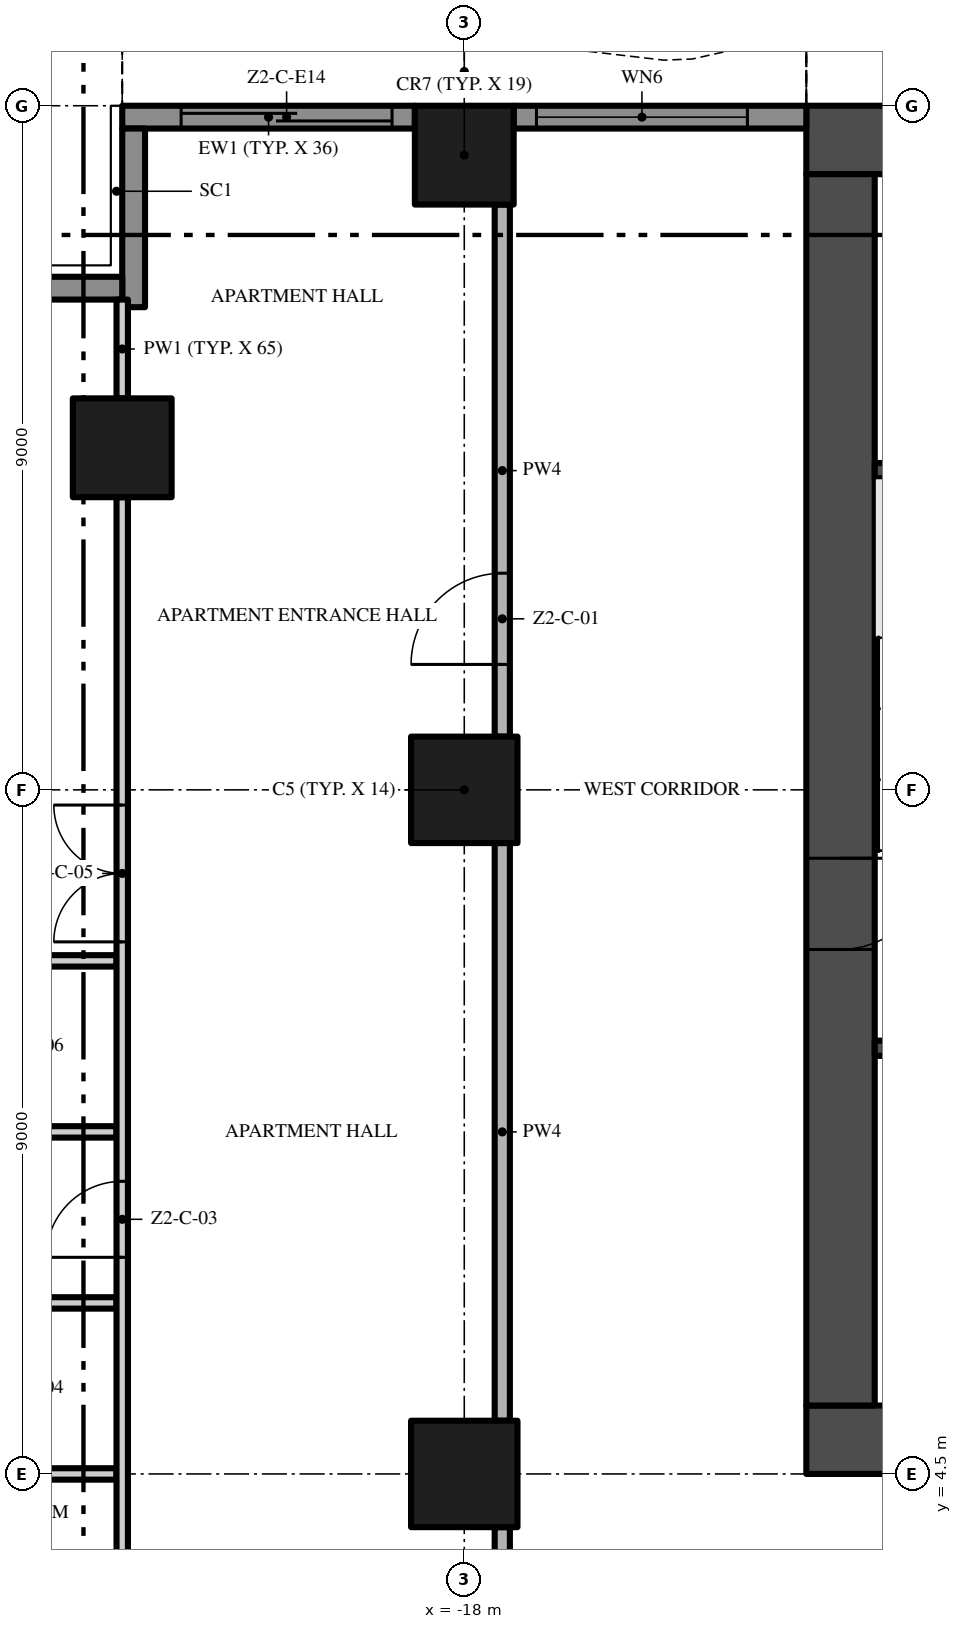
"""IFC4 building model, lengths in metres.
Left out: names, types, materials, properties, quantities, classifications, styles, units other than length and angle.
Written with IfcOpenShell. Run it as: python <this file> out.ifc"""

import sys

from ifc_helpers import new_model, si_unit, direction, frame, frame_2d, origin, origin_2d, place, context, subcontext, project, spatial, polyline, rectangle, outline, extrude, element, fill, save


model = new_model("IFC4")
c1 = context("Model", 3, precision=1e-05, world=origin(), true_north=direction((0.0, 1.0)))
c2 = subcontext(c1, "Body", "Model", "MODEL_VIEW")
j1 = project(units=[si_unit("LENGTHUNIT", "METRE"), si_unit("PLANEANGLEUNIT", "RADIAN")], contexts=[c1])
p1 = place(None, origin())
s1 = spatial("IfcSite", under=j1, at=p1, CompositionType="ELEMENT")
p2 = place(p1, origin())
s2 = spatial("IfcBuilding", under=s1, at=p2, CompositionType="ELEMENT")
p3 = place(p2, frame((0.0, 0.0, 96.0)))
s3 = spatial("IfcBuildingStorey", under=s2, at=p3, CompositionType="ELEMENT", Elevation=96.0)
p4 = place(p3, frame((-13.5, 4.95, -0.3), z_axis=(0.0, 0.0, 1.0), x_axis=(1.0, 0.0, 0.0)))
e1 = element("IfcWall", 1, at=p4, inside=s3, PredefinedType="SHEAR", context=c2, shape_type="SweptSolid", body=[
    extrude(rectangle(XDim=27.0, YDim=0.9, at=frame_2d((13.5, 0.0))), origin(), (0.0, 0.0, 1.0), 3.8),
])
p5 = place(p4, frame((12.0, 0.0, 0.3)))
e2 = element("IfcOpeningElement", 2, at=p5, cuts=e1, PredefinedType="OPENING", context=c2, shape_type="SweptSolid", body=[
    extrude(rectangle(XDim=3.0, YDim=2.4, at=frame_2d((1.5, 1.2))), frame((0.0, 0.46, 0.0), z_axis=(0.0, -1.0, 0.0), x_axis=(1.0, 0.0, 0.0)), (0.0, 0.0, 1.0), 0.92),
])
p6 = place(p4, frame((4.9, 0.0, 0.3)))
e3 = element("IfcOpeningElement", 3, at=p6, cuts=e1, PredefinedType="OPENING", context=c2, shape_type="SweptSolid", body=[
    extrude(rectangle(XDim=1.2, YDim=2.2, at=frame_2d((0.6, 1.1))), frame((0.0, 0.46, 0.0), z_axis=(0.0, -1.0, 0.0), x_axis=(1.0, 0.0, 0.0)), (0.0, 0.0, 1.0), 0.92),
])
p7 = place(p4, frame((20.75, 0.0, 0.3)))
e4 = element("IfcOpeningElement", 4, at=p7, cuts=e1, PredefinedType="OPENING", context=c2, shape_type="SweptSolid", body=[
    extrude(rectangle(XDim=1.5, YDim=2.2, at=frame_2d((0.75, 1.1))), frame((0.0, 0.46, 0.0), z_axis=(0.0, -1.0, 0.0), x_axis=(1.0, 0.0, 0.0)), (0.0, 0.0, 1.0), 0.92),
])
p8 = place(p4, frame((17.4, 0.0, 0.3)))
e5 = element("IfcOpeningElement", 5, at=p8, cuts=e1, PredefinedType="OPENING", context=c2, shape_type="SweptSolid", body=[
    extrude(rectangle(XDim=1.2, YDim=2.2, at=frame_2d((0.6, 1.1))), frame((0.0, 0.46, 0.0), z_axis=(0.0, -1.0, 0.0), x_axis=(1.0, 0.0, 0.0)), (0.0, 0.0, 1.0), 0.92),
])
p9 = place(p3, frame((13.5, 22.05, -0.3), z_axis=(0.0, 0.0, 1.0), x_axis=(-1.0, 0.0, 0.0)))
e6 = element("IfcWall", 6, at=p9, inside=s3, PredefinedType="SHEAR", context=c2, shape_type="SweptSolid", body=[
    extrude(rectangle(XDim=27.0, YDim=0.9, at=frame_2d((13.5, 0.0))), origin(), (0.0, 0.0, 1.0), 3.8),
])
p10 = place(p3, frame((-13.05, 21.6, -0.3), z_axis=(0.0, 0.0, 1.0), x_axis=(0.0, -1.0, 0.0)))
e7 = element("IfcWall", 7, at=p10, inside=s3, PredefinedType="SHEAR", context=c2, shape_type="SweptSolid", body=[
    extrude(rectangle(XDim=16.2, YDim=0.9, at=frame_2d((8.1, 0.0))), origin(), (0.0, 0.0, 1.0), 3.8),
])
p11 = place(p10, frame((9.0, 0.0, 0.3)))
e8 = element("IfcOpeningElement", 8, at=p11, cuts=e7, PredefinedType="OPENING", context=c2, shape_type="SweptSolid", body=[
    extrude(rectangle(XDim=1.2, YDim=2.2, at=frame_2d((0.6, 1.1))), frame((0.0, 0.46, 0.0), z_axis=(0.0, -1.0, 0.0), x_axis=(1.0, 0.0, 0.0)), (0.0, 0.0, 1.0), 0.92),
])
p12 = place(p3, frame((-18.0, 13.5, 0.0), z_axis=(0.0, 0.0, 1.0), x_axis=(1.0, 0.0, 0.0)))
e9 = element("IfcColumn", 9, at=p12, inside=s3, PredefinedType="COLUMN", context=c2, shape_type="SweptSolid", body=[
    extrude(rectangle(XDim=1.4, YDim=1.4, at=origin_2d()), origin(), (0.0, 0.0, 1.0), 3.5),
])
p13 = place(p3, frame((-18.0, 21.85, 0.0), z_axis=(0.0, 0.0, 1.0), x_axis=(1.0, 0.0, 0.0)))
e10 = element("IfcColumn", 10, at=p13, inside=s3, PredefinedType="COLUMN", context=c2, shape_type="SweptSolid", body=[
    extrude(rectangle(XDim=1.3, YDim=1.3, at=origin_2d()), origin(), (0.0, 0.0, 1.0), 3.5),
])
p14 = place(p3, frame((-18.0, 4.5, 0.0), z_axis=(0.0, 0.0, 1.0), x_axis=(1.0, 0.0, 0.0)))
e11 = element("IfcColumn", 11, at=p14, inside=s3, PredefinedType="COLUMN", context=c2, shape_type="SweptSolid", body=[
    extrude(rectangle(XDim=1.4, YDim=1.4, at=origin_2d()), origin(), (0.0, 0.0, 1.0), 3.5),
])
p15 = place(p3, frame((-22.5, 18.0, 0.0), z_axis=(0.0, 0.0, 1.0), x_axis=(1.0, 0.0, 0.0)))
e12 = element("IfcColumn", 12, at=p15, inside=s3, PredefinedType="COLUMN", context=c2, shape_type="SweptSolid", body=[
    extrude(rectangle(XDim=1.3, YDim=1.3, at=origin_2d()), origin(), (0.0, 0.0, 1.0), 3.5),
])
p16 = place(p3, frame((-17.35, 22.35, 0.0), z_axis=(0.0, 0.0, 1.0), x_axis=(1.0, 0.0, 0.0)))
e13 = element("IfcWall", 13, at=p16, inside=s3, PredefinedType="SOLIDWALL", context=c2, shape_type="SweptSolid", body=[
    extrude(rectangle(XDim=3.85, YDim=0.3, at=frame_2d((1.925, 0.0))), origin(), (0.0, 0.0, 1.0), 3.5),
])
p17 = place(p16, frame((0.3, 0.0, 0.45)))
e14 = element("IfcOpeningElement", 14, at=p17, cuts=e13, PredefinedType="OPENING", context=c2, shape_type="SweptSolid", body=[
    extrude(rectangle(XDim=2.775, YDim=2.65, at=frame_2d((1.387, 1.325))), frame((0.0, 0.16, 0.0), z_axis=(0.0, -1.0, 0.0), x_axis=(1.0, 0.0, 0.0)), (0.0, 0.0, 1.0), 0.32),
])
p18 = place(p3, frame((-22.5, 22.35, 0.0), z_axis=(0.0, 0.0, 1.0), x_axis=(1.0, 0.0, 0.0)))
e15 = element("IfcWall", 15, at=p18, inside=s3, PredefinedType="SOLIDWALL", context=c2, shape_type="SweptSolid", body=[
    extrude(rectangle(XDim=3.85, YDim=0.3, at=frame_2d((1.925, 0.0))), origin(), (0.0, 0.0, 1.0), 3.5),
])
p19 = place(p18, frame((0.775, 0.0, 0.0)))
e16 = element("IfcOpeningElement", 16, at=p19, cuts=e15, PredefinedType="OPENING", context=c2, shape_type="SweptSolid", body=[
    extrude(rectangle(XDim=2.775, YDim=2.4, at=frame_2d((1.387, 1.2))), frame((0.0, 0.16, 0.0), z_axis=(0.0, -1.0, 0.0), x_axis=(1.0, 0.0, 0.0)), (0.0, 0.0, 1.0), 0.32),
])
p20 = place(p3, frame((-22.35, 19.85, 0.0), z_axis=(0.0, 0.0, 1.0), x_axis=(0.0, 1.0, 0.0)))
e17 = element("IfcWall", 17, at=p20, inside=s3, PredefinedType="SOLIDWALL", context=c2, shape_type="SweptSolid", body=[
    extrude(rectangle(XDim=2.35, YDim=0.3, at=frame_2d((1.175, 0.0))), origin(), (0.0, 0.0, 1.0), 3.5),
])
p21 = place(p3, frame((-24.75, 20.1, 0.0), z_axis=(0.0, 0.0, 1.0), x_axis=(1.0, 0.0, 0.0)))
e18 = element("IfcWall", 18, at=p21, inside=s3, PredefinedType="SOLIDWALL", context=c2, shape_type="SweptSolid", body=[
    extrude(rectangle(XDim=2.25, YDim=0.3, at=frame_2d((1.125, 0.0))), origin(), (0.0, 0.0, 1.0), 3.5),
])
p22 = place(p3, origin())
e19 = element("IfcWall", 19, at=p22, inside=s3, PredefinedType="USERDEFINED", context=c2, shape_type="SweptSolid", body=[
    extrude(outline(polyline([(-13.5, 23.451), (-15.0, 23.115), (-15.375, 23.1), (-16.5, 23.231), (-18.0, 23.755), (-19.5, 24.488), (-21.0, 25.149), (-22.5, 25.485), (-22.555, 25.241), (-21.079, 24.91), (-19.605, 24.261), (-18.096, 23.524), (-16.556, 22.986), (-15.385, 22.849), (-14.967, 22.866), (-13.445, 23.208), (-13.5, 23.451)])), origin(), (0.0, 0.0, 1.0), 0.9),
])
for number, where, z_axis, x_axis in (
    (20, (-12.6, 10.1, 0.0), (0.0, 0.0, 1.0), (1.0, 0.0, 0.0)),
    (21, (-12.6, 17.7, 0.0), (0.0, 0.0, 1.0), (1.0, 0.0, 0.0)),
):
    element("IfcWall", number, at=place(p3, frame(where, z_axis=z_axis, x_axis=x_axis)), inside=s3, PredefinedType="SHEAR", context=c2, shape_type="SweptSolid", body=[
        extrude(rectangle(XDim=2.95, YDim=0.2, at=frame_2d((1.475, 0.0))), origin(), (0.0, 0.0, 1.0), 3.5),
    ])
p23 = place(p3, frame((-25.7, 4.5, 0.0), z_axis=(0.0, 0.0, 1.0), x_axis=(1.0, 0.0, 0.0)))
e22 = element("IfcWall", 22, at=p23, inside=s3, PredefinedType="PARTITIONING", context=c2, shape_type="SweptSolid", body=[
    extrude(rectangle(XDim=3.125, YDim=0.15, at=frame_2d((1.562, 0.0))), origin(), (0.0, 0.0, 1.0), 3.5),
])
p24 = place(p3, frame((-24.45, 6.75, 0.0), z_axis=(0.0, 0.0, 1.0), x_axis=(1.0, 0.0, 0.0)))
e23 = element("IfcWall", 23, at=p24, inside=s3, PredefinedType="PARTITIONING", context=c2, shape_type="SweptSolid", body=[
    extrude(rectangle(XDim=1.875, YDim=0.15, at=frame_2d((0.938, 0.0))), origin(), (0.0, 0.0, 1.0), 3.5),
])
p25 = place(p3, frame((-26.7, 9.0, 0.0), z_axis=(0.0, 0.0, 1.0), x_axis=(1.0, 0.0, 0.0)))
e24 = element("IfcWall", 24, at=p25, inside=s3, PredefinedType="PARTITIONING", context=c2, shape_type="SweptSolid", body=[
    extrude(rectangle(XDim=4.125, YDim=0.15, at=frame_2d((2.062, 0.0))), origin(), (0.0, 0.0, 1.0), 3.5),
])
p26 = place(p3, frame((-24.45, 11.25, 0.0), z_axis=(0.0, 0.0, 1.0), x_axis=(1.0, 0.0, 0.0)))
e25 = element("IfcWall", 25, at=p26, inside=s3, PredefinedType="PARTITIONING", context=c2, shape_type="SweptSolid", body=[
    extrude(rectangle(XDim=1.875, YDim=0.15, at=frame_2d((0.938, 0.0))), origin(), (0.0, 0.0, 1.0), 3.5),
])
p27 = place(p3, frame((-22.5, 0.1, 0.0), z_axis=(0.0, 0.0, 1.0), x_axis=(0.0, 1.0, 0.0)))
e26 = element("IfcWall", 26, at=p27, inside=s3, PredefinedType="PARTITIONING", context=c2, shape_type="SweptSolid", body=[
    extrude(rectangle(XDim=17.25, YDim=0.15, at=frame_2d((8.625, 0.0))), origin(), (0.0, 0.0, 1.0), 3.5),
])
p28 = place(p27, frame((1.65, 0.0, 0.0)))
e27 = element("IfcOpeningElement", 27, at=p28, cuts=e26, PredefinedType="OPENING", context=c2, shape_type="SweptSolid", body=[
    extrude(rectangle(XDim=1.0, YDim=2.4, at=frame_2d((0.5, 1.2))), frame((0.0, 0.085, 0.0), z_axis=(0.0, -1.0, 0.0), x_axis=(1.0, 0.0, 0.0)), (0.0, 0.0, 1.0), 0.17),
])
p29 = place(p27, frame((7.25, 0.0, 0.0)))
e28 = element("IfcOpeningElement", 28, at=p29, cuts=e26, PredefinedType="OPENING", context=c2, shape_type="SweptSolid", body=[
    extrude(rectangle(XDim=1.0, YDim=2.4, at=frame_2d((0.5, 1.2))), frame((0.0, 0.085, 0.0), z_axis=(0.0, -1.0, 0.0), x_axis=(1.0, 0.0, 0.0)), (0.0, 0.0, 1.0), 0.17),
])
p30 = place(p27, frame((11.4, 0.0, 0.0)))
e29 = element("IfcOpeningElement", 29, at=p30, cuts=e26, PredefinedType="OPENING", context=c2, shape_type="SweptSolid", body=[
    extrude(rectangle(XDim=1.8, YDim=2.4, at=frame_2d((0.9, 1.2))), frame((0.0, 0.085, 0.0), z_axis=(0.0, -1.0, 0.0), x_axis=(1.0, 0.0, 0.0)), (0.0, 0.0, 1.0), 0.17),
])
p31 = place(p3, frame((-22.5, 18.65, 0.0), z_axis=(0.0, 0.0, 1.0), x_axis=(0.0, 1.0, 0.0)))
e30 = element("IfcWall", 30, at=p31, inside=s3, PredefinedType="PARTITIONING", context=c2, shape_type="SweptSolid", body=[
    extrude(rectangle(XDim=1.3, YDim=0.15, at=frame_2d((0.65, 0.0))), origin(), (0.0, 0.0, 1.0), 3.5),
])
p32 = place(p3, frame((-17.5, -0.2, 0.0), z_axis=(0.0, 0.0, 1.0), x_axis=(0.0, 1.0, 0.0)))
e31 = element("IfcWall", 31, at=p32, inside=s3, PredefinedType="PARTITIONING", context=c2, shape_type="SweptSolid", body=[
    extrude(rectangle(XDim=4.0, YDim=0.2, at=frame_2d((2.0, 0.0))), origin(), (0.0, 0.0, 1.0), 3.5),
])
p33 = place(p3, frame((-17.5, 5.2, 0.0), z_axis=(0.0, 0.0, 1.0), x_axis=(0.0, 1.0, 0.0)))
e32 = element("IfcWall", 32, at=p33, inside=s3, PredefinedType="PARTITIONING", context=c2, shape_type="SweptSolid", body=[
    extrude(rectangle(XDim=7.6, YDim=0.2, at=frame_2d((3.8, 0.0))), origin(), (0.0, 0.0, 1.0), 3.5),
])
p34 = place(p3, frame((-17.5, 14.2, 0.0), z_axis=(0.0, 0.0, 1.0), x_axis=(0.0, 1.0, 0.0)))
e33 = element("IfcWall", 33, at=p34, inside=s3, PredefinedType="PARTITIONING", context=c2, shape_type="SweptSolid", body=[
    extrude(rectangle(XDim=7.0, YDim=0.2, at=frame_2d((3.5, 0.0))), origin(), (0.0, 0.0, 1.0), 3.5),
])
p35 = place(p34, frame((0.95, 0.0, 0.0)))
e34 = element("IfcOpeningElement", 34, at=p35, cuts=e33, PredefinedType="OPENING", context=c2, shape_type="SweptSolid", body=[
    extrude(rectangle(XDim=1.2, YDim=2.4, at=frame_2d((0.6, 1.2))), frame((0.0, 0.11, 0.0), z_axis=(0.0, -1.0, 0.0), x_axis=(1.0, 0.0, 0.0)), (0.0, 0.0, 1.0), 0.22),
])
p36 = place(p17, origin())
e35 = element("IfcWindow", 35, at=p36, inside=s3, PartitioningType="SINGLE_PANEL", PredefinedType="WINDOW", context=c2, shape_type="SweptSolid", body=[
    extrude(rectangle(XDim=2.775, YDim=2.65, at=frame_2d((1.387, 1.325))), frame((0.0, 0.03, 0.0), z_axis=(0.0, -1.0, 0.0), x_axis=(1.0, 0.0, 0.0)), (0.0, 0.0, 1.0), 0.06),
])
fill(e14, e35)
p37 = place(p19, origin())
e36 = element("IfcDoor", 36, at=p37, inside=s3, OperationType="SINGLE_SWING_LEFT", PredefinedType="DOOR", context=c2, shape_type="SweptSolid", body=[
    extrude(rectangle(XDim=2.775, YDim=2.4, at=frame_2d((1.387, 1.2))), frame((0.0, 0.025, 0.0), z_axis=(0.0, -1.0, 0.0), x_axis=(1.0, 0.0, 0.0)), (0.0, 0.0, 1.0), 0.05),
])
fill(e16, e36)
p38 = place(p11, frame((1.2, 0.0, 0.0), z_axis=(0.0, 0.0, 1.0), x_axis=(-1.0, 0.0, 0.0)))
e37 = element("IfcDoor", 37, at=p38, inside=s3, OperationType="SINGLE_SWING_RIGHT", PredefinedType="DOOR", context=c2, shape_type="SweptSolid", body=[
    extrude(rectangle(XDim=1.2, YDim=2.2, at=frame_2d((0.6, 1.1))), frame((0.0, 0.025, 0.0), z_axis=(0.0, -1.0, 0.0), x_axis=(1.0, 0.0, 0.0)), (0.0, 0.0, 1.0), 0.05),
])
fill(e8, e37)
p39 = place(p35, origin())
e38 = element("IfcDoor", 38, at=p39, inside=s3, OperationType="SINGLE_SWING_LEFT", PredefinedType="DOOR", context=c2, shape_type="SweptSolid", body=[
    extrude(rectangle(XDim=1.2, YDim=2.4, at=frame_2d((0.6, 1.2))), frame((0.0, 0.025, 0.0), z_axis=(0.0, -1.0, 0.0), x_axis=(1.0, 0.0, 0.0)), (0.0, 0.0, 1.0), 0.05),
])
fill(e34, e38)
p40 = place(p29, origin())
e39 = element("IfcDoor", 39, at=p40, inside=s3, OperationType="SINGLE_SWING_LEFT", PredefinedType="DOOR", context=c2, shape_type="SweptSolid", body=[
    extrude(rectangle(XDim=1.0, YDim=2.4, at=frame_2d((0.5, 1.2))), frame((0.0, 0.025, 0.0), z_axis=(0.0, -1.0, 0.0), x_axis=(1.0, 0.0, 0.0)), (0.0, 0.0, 1.0), 0.05),
])
fill(e28, e39)
p41 = place(p30, origin())
e40 = element("IfcDoor", 40, at=p41, inside=s3, OperationType="DOUBLE_DOOR_SINGLE_SWING", PredefinedType="DOOR", context=c2, shape_type="SweptSolid", body=[
    extrude(rectangle(XDim=1.8, YDim=2.4, at=frame_2d((0.9, 1.2))), frame((0.0, 0.025, 0.0), z_axis=(0.0, -1.0, 0.0), x_axis=(1.0, 0.0, 0.0)), (0.0, 0.0, 1.0), 0.05),
])
fill(e29, e40)
save(model, sys.argv[1])
